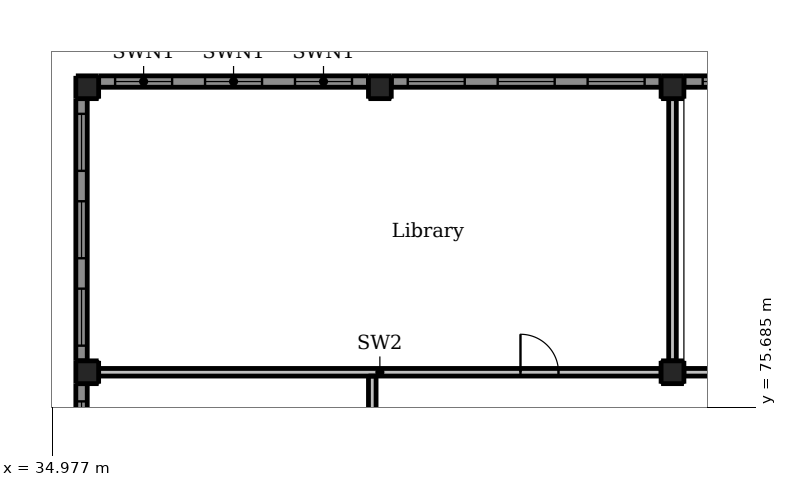
"""IFC4 building model, lengths in metres.
Left out: names, types, materials, properties, quantities, classifications, styles, units other than length and angle.
Written with IfcOpenShell. Run it as: python <this file> out.ifc"""

import sys

from ifc_helpers import new_model, si_unit, direction, frame, frame_2d, origin, origin_2d, place, context, subcontext, project, spatial, rectangle, extrude, element, fill, save


model = new_model("IFC4")
c1 = context("Model", 3, precision=1e-05, world=origin(), true_north=direction((0.0, 1.0)))
c2 = subcontext(c1, "Body", "Model", "MODEL_VIEW")
j1 = project(units=[si_unit("LENGTHUNIT", "METRE"), si_unit("PLANEANGLEUNIT", "RADIAN")], contexts=[c1])
p1 = place(None, origin())
s1 = spatial("IfcSite", under=j1, at=p1, CompositionType="ELEMENT")
p2 = place(p1, origin())
s2 = spatial("IfcBuilding", under=s1, at=p2, CompositionType="ELEMENT")
p3 = place(p2, frame((0.0, 0.0, 10.0)))
s3 = spatial("IfcBuildingStorey", under=s2, at=p3, CompositionType="ELEMENT", Elevation=10.0)
for number, where, z_axis, x_axis in (
    (1, (35.9, 76.6, -0.3), (0.0, 0.0, 1.0), (1.0, 0.0, 0.0)),
    (2, (51.3, 76.6, -0.3), (0.0, 0.0, 1.0), (1.0, 0.0, 0.0)),
    (3, (35.9, 84.1, -0.3), (0.0, 0.0, 1.0), (1.0, 0.0, 0.0)),
    (4, (51.3, 84.1, -0.3), (0.0, 0.0, 1.0), (1.0, 0.0, 0.0)),
    (5, (43.6, 84.1, -0.3), (0.0, 0.0, 1.0), (1.0, 0.0, 0.0)),
):
    element("IfcColumn", number, at=place(p3, frame(where, z_axis=z_axis, x_axis=x_axis)), inside=s3, PredefinedType="COLUMN", context=c2, shape_type="SweptSolid", body=[
        extrude(rectangle(XDim=0.6, YDim=0.6, at=origin_2d()), origin(), (0.0, 0.0, 1.0), 4.5),
    ])
p4 = place(p3, frame((35.75, 69.0, 0.0), z_axis=(0.0, 0.0, 1.0), x_axis=(0.0, 1.0, 0.0)))
e6 = element("IfcWall", 6, at=p4, inside=s3, PredefinedType="SOLIDWALL", context=c2, shape_type="SweptSolid", body=[
    extrude(rectangle(XDim=7.3, YDim=0.3, at=frame_2d((3.65, 0.0))), origin(), (0.0, 0.0, 1.0), 3.3),
])
p5 = place(p4, frame((0.467, 0.0, 0.9)))
e7 = element("IfcOpeningElement", 7, at=p5, cuts=e6, PredefinedType="OPENING", context=c2, shape_type="SweptSolid", body=[
    extrude(rectangle(XDim=1.5, YDim=1.5, at=frame_2d((0.75, 0.75))), frame((0.0, 0.16, 0.0), z_axis=(0.0, -1.0, 0.0), x_axis=(1.0, 0.0, 0.0)), (0.0, 0.0, 1.0), 0.32),
])
p6 = place(p4, frame((2.9, 0.0, 0.9)))
e8 = element("IfcOpeningElement", 8, at=p6, cuts=e6, PredefinedType="OPENING", context=c2, shape_type="SweptSolid", body=[
    extrude(rectangle(XDim=1.5, YDim=1.5, at=frame_2d((0.75, 0.75))), frame((0.0, 0.16, 0.0), z_axis=(0.0, -1.0, 0.0), x_axis=(1.0, 0.0, 0.0)), (0.0, 0.0, 1.0), 0.32),
])
p7 = place(p4, frame((5.333, 0.0, 0.9)))
e9 = element("IfcOpeningElement", 9, at=p7, cuts=e6, PredefinedType="OPENING", context=c2, shape_type="SweptSolid", body=[
    extrude(rectangle(XDim=1.5, YDim=1.5, at=frame_2d((0.75, 0.75))), frame((0.0, 0.16, 0.0), z_axis=(0.0, -1.0, 0.0), x_axis=(1.0, 0.0, 0.0)), (0.0, 0.0, 1.0), 0.32),
])
p8 = place(p3, frame((35.75, 76.9, 0.0), z_axis=(0.0, 0.0, 1.0), x_axis=(0.0, 1.0, 0.0)))
e10 = element("IfcWall", 10, at=p8, inside=s3, PredefinedType="SOLIDWALL", context=c2, shape_type="SweptSolid", body=[
    extrude(rectangle(XDim=6.9, YDim=0.3, at=frame_2d((3.45, 0.0))), origin(), (0.0, 0.0, 1.0), 3.3),
])
p9 = place(p8, frame((0.4, 0.0, 0.9)))
e11 = element("IfcOpeningElement", 11, at=p9, cuts=e10, PredefinedType="OPENING", context=c2, shape_type="SweptSolid", body=[
    extrude(rectangle(XDim=1.5, YDim=1.5, at=frame_2d((0.75, 0.75))), frame((0.0, 0.16, 0.0), z_axis=(0.0, -1.0, 0.0), x_axis=(1.0, 0.0, 0.0)), (0.0, 0.0, 1.0), 0.32),
])
p10 = place(p8, frame((2.7, 0.0, 0.9)))
e12 = element("IfcOpeningElement", 12, at=p10, cuts=e10, PredefinedType="OPENING", context=c2, shape_type="SweptSolid", body=[
    extrude(rectangle(XDim=1.5, YDim=1.5, at=frame_2d((0.75, 0.75))), frame((0.0, 0.16, 0.0), z_axis=(0.0, -1.0, 0.0), x_axis=(1.0, 0.0, 0.0)), (0.0, 0.0, 1.0), 0.32),
])
p11 = place(p8, frame((5.0, 0.0, 0.9)))
e13 = element("IfcOpeningElement", 13, at=p11, cuts=e10, PredefinedType="OPENING", context=c2, shape_type="SweptSolid", body=[
    extrude(rectangle(XDim=1.5, YDim=1.5, at=frame_2d((0.75, 0.75))), frame((0.0, 0.16, 0.0), z_axis=(0.0, -1.0, 0.0), x_axis=(1.0, 0.0, 0.0)), (0.0, 0.0, 1.0), 0.32),
])
p12 = place(p3, frame((36.2, 84.25, 0.0), z_axis=(0.0, 0.0, 1.0), x_axis=(1.0, 0.0, 0.0)))
e14 = element("IfcWall", 14, at=p12, inside=s3, PredefinedType="SOLIDWALL", context=c2, shape_type="SweptSolid", body=[
    extrude(rectangle(XDim=7.1, YDim=0.3, at=frame_2d((3.55, 0.0))), origin(), (0.0, 0.0, 1.0), 3.3),
])
p13 = place(p12, frame((0.433, 0.0, 0.9)))
e15 = element("IfcOpeningElement", 15, at=p13, cuts=e14, PredefinedType="OPENING", context=c2, shape_type="SweptSolid", body=[
    extrude(rectangle(XDim=1.5, YDim=1.5, at=frame_2d((0.75, 0.75))), frame((0.0, 0.16, 0.0), z_axis=(0.0, -1.0, 0.0), x_axis=(1.0, 0.0, 0.0)), (0.0, 0.0, 1.0), 0.32),
])
p14 = place(p12, frame((2.8, 0.0, 0.9)))
e16 = element("IfcOpeningElement", 16, at=p14, cuts=e14, PredefinedType="OPENING", context=c2, shape_type="SweptSolid", body=[
    extrude(rectangle(XDim=1.5, YDim=1.5, at=frame_2d((0.75, 0.75))), frame((0.0, 0.16, 0.0), z_axis=(0.0, -1.0, 0.0), x_axis=(1.0, 0.0, 0.0)), (0.0, 0.0, 1.0), 0.32),
])
p15 = place(p12, frame((5.167, 0.0, 0.9)))
e17 = element("IfcOpeningElement", 17, at=p15, cuts=e14, PredefinedType="OPENING", context=c2, shape_type="SweptSolid", body=[
    extrude(rectangle(XDim=1.5, YDim=1.5, at=frame_2d((0.75, 0.75))), frame((0.0, 0.16, 0.0), z_axis=(0.0, -1.0, 0.0), x_axis=(1.0, 0.0, 0.0)), (0.0, 0.0, 1.0), 0.32),
])
p16 = place(p3, frame((43.9, 84.25, 0.0), z_axis=(0.0, 0.0, 1.0), x_axis=(1.0, 0.0, 0.0)))
e18 = element("IfcWall", 18, at=p16, inside=s3, PredefinedType="SOLIDWALL", context=c2, shape_type="SweptSolid", body=[
    extrude(rectangle(XDim=7.1, YDim=0.3, at=frame_2d((3.55, 0.0))), origin(), (0.0, 0.0, 1.0), 3.3),
])
p17 = place(p16, frame((0.433, 0.0, 0.9)))
e19 = element("IfcOpeningElement", 19, at=p17, cuts=e18, PredefinedType="OPENING", context=c2, shape_type="SweptSolid", body=[
    extrude(rectangle(XDim=1.5, YDim=1.5, at=frame_2d((0.75, 0.75))), frame((0.0, 0.16, 0.0), z_axis=(0.0, -1.0, 0.0), x_axis=(1.0, 0.0, 0.0)), (0.0, 0.0, 1.0), 0.32),
])
p18 = place(p16, frame((2.8, 0.0, 0.9)))
e20 = element("IfcOpeningElement", 20, at=p18, cuts=e18, PredefinedType="OPENING", context=c2, shape_type="SweptSolid", body=[
    extrude(rectangle(XDim=1.5, YDim=1.5, at=frame_2d((0.75, 0.75))), frame((0.0, 0.16, 0.0), z_axis=(0.0, -1.0, 0.0), x_axis=(1.0, 0.0, 0.0)), (0.0, 0.0, 1.0), 0.32),
])
p19 = place(p16, frame((5.167, 0.0, 0.9)))
e21 = element("IfcOpeningElement", 21, at=p19, cuts=e18, PredefinedType="OPENING", context=c2, shape_type="SweptSolid", body=[
    extrude(rectangle(XDim=1.5, YDim=1.5, at=frame_2d((0.75, 0.75))), frame((0.0, 0.16, 0.0), z_axis=(0.0, -1.0, 0.0), x_axis=(1.0, 0.0, 0.0)), (0.0, 0.0, 1.0), 0.32),
])
p20 = place(p3, frame((51.6, 84.25, 0.0), z_axis=(0.0, 0.0, 1.0), x_axis=(1.0, 0.0, 0.0)))
e22 = element("IfcWall", 22, at=p20, inside=s3, PredefinedType="SOLIDWALL", context=c2, shape_type="SweptSolid", body=[
    extrude(rectangle(XDim=7.467, YDim=0.3, at=frame_2d((3.733, 0.0))), origin(), (0.0, 0.0, 1.0), 3.3),
])
p21 = place(p20, frame((0.494, 0.0, 0.9)))
e23 = element("IfcOpeningElement", 23, at=p21, cuts=e22, PredefinedType="OPENING", context=c2, shape_type="SweptSolid", body=[
    extrude(rectangle(XDim=1.5, YDim=1.5, at=frame_2d((0.75, 0.75))), frame((0.0, 0.16, 0.0), z_axis=(0.0, -1.0, 0.0), x_axis=(1.0, 0.0, 0.0)), (0.0, 0.0, 1.0), 0.32),
])
p22 = place(p20, frame((2.983, 0.0, 0.9)))
e24 = element("IfcOpeningElement", 24, at=p22, cuts=e22, PredefinedType="OPENING", context=c2, shape_type="SweptSolid", body=[
    extrude(rectangle(XDim=1.5, YDim=1.5, at=frame_2d((0.75, 0.75))), frame((0.0, 0.16, 0.0), z_axis=(0.0, -1.0, 0.0), x_axis=(1.0, 0.0, 0.0)), (0.0, 0.0, 1.0), 0.32),
])
p23 = place(p20, frame((5.472, 0.0, 0.9)))
e25 = element("IfcOpeningElement", 25, at=p23, cuts=e22, PredefinedType="OPENING", context=c2, shape_type="SweptSolid", body=[
    extrude(rectangle(XDim=1.5, YDim=1.5, at=frame_2d((0.75, 0.75))), frame((0.0, 0.16, 0.0), z_axis=(0.0, -1.0, 0.0), x_axis=(1.0, 0.0, 0.0)), (0.0, 0.0, 1.0), 0.32),
])
p24 = place(p3, frame((43.4, 68.8, 0.0), z_axis=(0.0, 0.0, 1.0), x_axis=(0.0, 1.0, 0.0)))
e26 = element("IfcWall", 26, at=p24, inside=s3, PredefinedType="PARTITIONING", context=c2, shape_type="SweptSolid", body=[
    extrude(rectangle(XDim=7.7, YDim=0.2, at=frame_2d((3.85, 0.0))), origin(), (0.0, 0.0, 1.0), 3.1),
])
p25 = place(p24, frame((3.35, 0.0, 0.0)))
e27 = element("IfcOpeningElement", 27, at=p25, cuts=e26, PredefinedType="OPENING", context=c2, shape_type="SweptSolid", body=[
    extrude(rectangle(XDim=1.0, YDim=2.1, at=frame_2d((0.5, 1.05))), frame((0.0, 0.11, 0.0), z_axis=(0.0, -1.0, 0.0), x_axis=(1.0, 0.0, 0.0)), (0.0, 0.0, 1.0), 0.22),
])
p26 = place(p3, frame((36.2, 76.6, 0.0), z_axis=(0.0, 0.0, 1.0), x_axis=(1.0, 0.0, 0.0)))
e28 = element("IfcWall", 28, at=p26, inside=s3, PredefinedType="PARTITIONING", context=c2, shape_type="SweptSolid", body=[
    extrude(rectangle(XDim=14.8, YDim=0.2, at=frame_2d((7.4, 0.0))), origin(), (0.0, 0.0, 1.0), 3.1),
])
p27 = place(p26, frame((11.1, 0.0, 0.0)))
e29 = element("IfcOpeningElement", 29, at=p27, cuts=e28, PredefinedType="OPENING", context=c2, shape_type="SweptSolid", body=[
    extrude(rectangle(XDim=1.0, YDim=2.1, at=frame_2d((0.5, 1.05))), frame((0.0, 0.11, 0.0), z_axis=(0.0, -1.0, 0.0), x_axis=(1.0, 0.0, 0.0)), (0.0, 0.0, 1.0), 0.22),
])
p28 = place(p3, frame((51.3, 76.9, 0.0), z_axis=(0.0, 0.0, 1.0), x_axis=(0.0, 1.0, 0.0)))
e30 = element("IfcWall", 30, at=p28, inside=s3, PredefinedType="PARTITIONING", context=c2, shape_type="SweptSolid", body=[
    extrude(rectangle(XDim=6.9, YDim=0.2, at=frame_2d((3.45, 0.0))), origin(), (0.0, 0.0, 1.0), 3.1),
])
p29 = place(p3, frame((51.6, 76.6, 0.0), z_axis=(0.0, 0.0, 1.0), x_axis=(1.0, 0.0, 0.0)))
e31 = element("IfcWall", 31, at=p29, inside=s3, PredefinedType="PARTITIONING", context=c2, shape_type="SweptSolid", body=[
    extrude(rectangle(XDim=7.667, YDim=0.2, at=frame_2d((3.833, 0.0))), origin(), (0.0, 0.0, 1.0), 3.1),
])
p30 = place(p29, frame((3.333, 0.0, 0.0)))
e32 = element("IfcOpeningElement", 32, at=p30, cuts=e31, PredefinedType="OPENING", context=c2, shape_type="SweptSolid", body=[
    extrude(rectangle(XDim=1.0, YDim=2.1, at=frame_2d((0.5, 1.05))), frame((0.0, 0.11, 0.0), z_axis=(0.0, -1.0, 0.0), x_axis=(1.0, 0.0, 0.0)), (0.0, 0.0, 1.0), 0.22),
])
p31 = place(p7, origin())
e33 = element("IfcWindow", 33, at=p31, inside=s3, PartitioningType="DOUBLE_PANEL_HORIZONTAL", PredefinedType="WINDOW", context=c2, shape_type="SweptSolid", body=[
    extrude(rectangle(XDim=1.5, YDim=1.5, at=frame_2d((0.75, 0.75))), frame((0.0, 0.03, 0.0), z_axis=(0.0, -1.0, 0.0), x_axis=(1.0, 0.0, 0.0)), (0.0, 0.0, 1.0), 0.06),
])
fill(e9, e33)
p32 = place(p9, origin())
e34 = element("IfcWindow", 34, at=p32, inside=s3, PartitioningType="DOUBLE_PANEL_HORIZONTAL", PredefinedType="WINDOW", context=c2, shape_type="SweptSolid", body=[
    extrude(rectangle(XDim=1.5, YDim=1.5, at=frame_2d((0.75, 0.75))), frame((0.0, 0.03, 0.0), z_axis=(0.0, -1.0, 0.0), x_axis=(1.0, 0.0, 0.0)), (0.0, 0.0, 1.0), 0.06),
])
fill(e11, e34)
p33 = place(p10, origin())
e35 = element("IfcWindow", 35, at=p33, inside=s3, PartitioningType="DOUBLE_PANEL_HORIZONTAL", PredefinedType="WINDOW", context=c2, shape_type="SweptSolid", body=[
    extrude(rectangle(XDim=1.5, YDim=1.5, at=frame_2d((0.75, 0.75))), frame((0.0, 0.03, 0.0), z_axis=(0.0, -1.0, 0.0), x_axis=(1.0, 0.0, 0.0)), (0.0, 0.0, 1.0), 0.06),
])
fill(e12, e35)
p34 = place(p11, origin())
e36 = element("IfcWindow", 36, at=p34, inside=s3, PartitioningType="DOUBLE_PANEL_HORIZONTAL", PredefinedType="WINDOW", context=c2, shape_type="SweptSolid", body=[
    extrude(rectangle(XDim=1.5, YDim=1.5, at=frame_2d((0.75, 0.75))), frame((0.0, 0.03, 0.0), z_axis=(0.0, -1.0, 0.0), x_axis=(1.0, 0.0, 0.0)), (0.0, 0.0, 1.0), 0.06),
])
fill(e13, e36)
p35 = place(p13, origin())
e37 = element("IfcWindow", 37, at=p35, inside=s3, PartitioningType="DOUBLE_PANEL_HORIZONTAL", PredefinedType="WINDOW", context=c2, shape_type="SweptSolid", body=[
    extrude(rectangle(XDim=1.5, YDim=1.5, at=frame_2d((0.75, 0.75))), frame((0.0, 0.03, 0.0), z_axis=(0.0, -1.0, 0.0), x_axis=(1.0, 0.0, 0.0)), (0.0, 0.0, 1.0), 0.06),
])
fill(e15, e37)
p36 = place(p14, origin())
e38 = element("IfcWindow", 38, at=p36, inside=s3, PartitioningType="DOUBLE_PANEL_HORIZONTAL", PredefinedType="WINDOW", context=c2, shape_type="SweptSolid", body=[
    extrude(rectangle(XDim=1.5, YDim=1.5, at=frame_2d((0.75, 0.75))), frame((0.0, 0.03, 0.0), z_axis=(0.0, -1.0, 0.0), x_axis=(1.0, 0.0, 0.0)), (0.0, 0.0, 1.0), 0.06),
])
fill(e16, e38)
p37 = place(p15, origin())
e39 = element("IfcWindow", 39, at=p37, inside=s3, PartitioningType="DOUBLE_PANEL_HORIZONTAL", PredefinedType="WINDOW", context=c2, shape_type="SweptSolid", body=[
    extrude(rectangle(XDim=1.5, YDim=1.5, at=frame_2d((0.75, 0.75))), frame((0.0, 0.03, 0.0), z_axis=(0.0, -1.0, 0.0), x_axis=(1.0, 0.0, 0.0)), (0.0, 0.0, 1.0), 0.06),
])
fill(e17, e39)
p38 = place(p17, origin())
e40 = element("IfcWindow", 40, at=p38, inside=s3, PartitioningType="DOUBLE_PANEL_HORIZONTAL", PredefinedType="WINDOW", context=c2, shape_type="SweptSolid", body=[
    extrude(rectangle(XDim=1.5, YDim=1.5, at=frame_2d((0.75, 0.75))), frame((0.0, 0.03, 0.0), z_axis=(0.0, -1.0, 0.0), x_axis=(1.0, 0.0, 0.0)), (0.0, 0.0, 1.0), 0.06),
])
fill(e19, e40)
p39 = place(p18, origin())
e41 = element("IfcWindow", 41, at=p39, inside=s3, PartitioningType="DOUBLE_PANEL_HORIZONTAL", PredefinedType="WINDOW", context=c2, shape_type="SweptSolid", body=[
    extrude(rectangle(XDim=1.5, YDim=1.5, at=frame_2d((0.75, 0.75))), frame((0.0, 0.03, 0.0), z_axis=(0.0, -1.0, 0.0), x_axis=(1.0, 0.0, 0.0)), (0.0, 0.0, 1.0), 0.06),
])
fill(e20, e41)
p40 = place(p19, origin())
e42 = element("IfcWindow", 42, at=p40, inside=s3, PartitioningType="DOUBLE_PANEL_HORIZONTAL", PredefinedType="WINDOW", context=c2, shape_type="SweptSolid", body=[
    extrude(rectangle(XDim=1.5, YDim=1.5, at=frame_2d((0.75, 0.75))), frame((0.0, 0.03, 0.0), z_axis=(0.0, -1.0, 0.0), x_axis=(1.0, 0.0, 0.0)), (0.0, 0.0, 1.0), 0.06),
])
fill(e21, e42)
p41 = place(p21, origin())
e43 = element("IfcWindow", 43, at=p41, inside=s3, PartitioningType="DOUBLE_PANEL_HORIZONTAL", PredefinedType="WINDOW", context=c2, shape_type="SweptSolid", body=[
    extrude(rectangle(XDim=1.5, YDim=1.5, at=frame_2d((0.75, 0.75))), frame((0.0, 0.03, 0.0), z_axis=(0.0, -1.0, 0.0), x_axis=(1.0, 0.0, 0.0)), (0.0, 0.0, 1.0), 0.06),
])
fill(e23, e43)
p42 = place(p27, origin())
e44 = element("IfcDoor", 44, at=p42, inside=s3, OperationType="SINGLE_SWING_LEFT", PredefinedType="DOOR", context=c2, shape_type="SweptSolid", body=[
    extrude(rectangle(XDim=1.0, YDim=2.1, at=frame_2d((0.5, 1.05))), frame((0.0, 0.025, 0.0), z_axis=(0.0, -1.0, 0.0), x_axis=(1.0, 0.0, 0.0)), (0.0, 0.0, 1.0), 0.05),
])
fill(e29, e44)
save(model, sys.argv[1])
